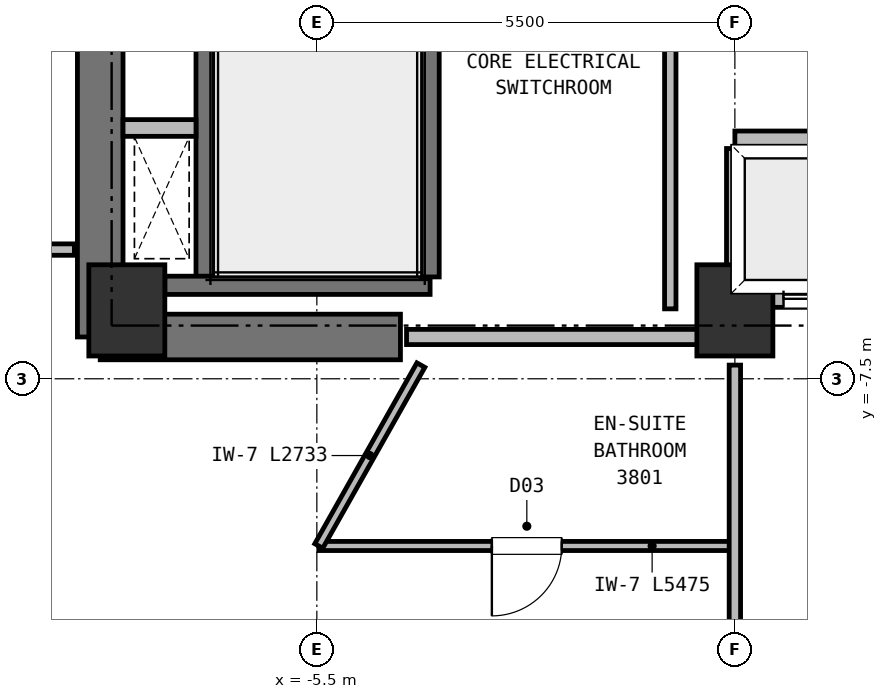
"""IFC4 building model, lengths in metres.
Left out: names, types, materials, properties, quantities, classifications, styles, units other than length and angle.
Written with IfcOpenShell. Run it as: python <this file> out.ifc"""

import sys

from ifc_helpers import new_model, si_unit, direction, frame, frame_2d, origin, origin_2d, place, context, subcontext, project, spatial, rectangle, extrude, element, fill, save


model = new_model("IFC4")
c1 = context("Model", 3, precision=1e-05, world=origin(), true_north=direction((0.0, 1.0)))
c2 = subcontext(c1, "Body", "Model", "MODEL_VIEW")
j1 = project(units=[si_unit("LENGTHUNIT", "METRE"), si_unit("PLANEANGLEUNIT", "RADIAN")], contexts=[c1])
p1 = place(None, origin())
s1 = spatial("IfcSite", under=j1, at=p1, CompositionType="ELEMENT")
p2 = place(p1, origin())
s2 = spatial("IfcBuilding", under=s1, at=p2, CompositionType="ELEMENT")
p3 = place(p2, frame((0.0, 0.0, 142.25)))
s3 = spatial("IfcBuildingStorey", under=s2, at=p3, CompositionType="ELEMENT", Elevation=142.25)
for number, where, z_axis, x_axis in (
    (1, (-8.0, -6.6, 0.0), (0.0, 0.0, 1.0), (1.0, 0.0, 0.0)),
    (2, (0.0, -6.6, 0.0), (0.0, 0.0, 1.0), (1.0, 0.0, 0.0)),
):
    element("IfcColumn", number, at=place(p3, frame(where, z_axis=z_axis, x_axis=x_axis)), inside=s3, PredefinedType="COLUMN", context=c2, shape_type="SweptSolid", body=[
        extrude(rectangle(XDim=1.0, YDim=1.2, at=origin_2d()), origin(), (0.0, 0.0, 1.0), 3.75),
    ])
p4 = place(p3, frame((-8.35, -6.95, 0.0), z_axis=(0.0, 0.0, 1.0), x_axis=(1.0, 0.0, 0.0)))
e3 = element("IfcWall", 3, at=p4, inside=s3, PredefinedType="SHEAR", context=c2, shape_type="SweptSolid", body=[
    extrude(rectangle(XDim=3.95, YDim=0.6, at=frame_2d((1.975, 0.0))), origin(), (0.0, 0.0, 1.0), 3.5),
])
p5 = place(p3, frame((-8.35, -6.95, 0.0), z_axis=(0.0, 0.0, 1.0), x_axis=(0.0, 1.0, 0.0)))
e4 = element("IfcWall", 4, at=p5, inside=s3, PredefinedType="SHEAR", context=c2, shape_type="SweptSolid", body=[
    extrude(rectangle(XDim=8.1, YDim=0.6, at=frame_2d((4.05, 0.0))), origin(), (0.0, 0.0, 1.0), 3.5),
])
p6 = place(p3, frame((-6.97, -6.16, 0.0), z_axis=(0.0, 0.0, 1.0), x_axis=(0.0, 1.0, 0.0)))
e5 = element("IfcWall", 5, at=p6, inside=s3, PredefinedType="SHEAR", context=c2, shape_type="SweptSolid", body=[
    extrude(rectangle(XDim=7.22, YDim=0.24, at=frame_2d((3.61, 0.0))), origin(), (0.0, 0.0, 1.0), 3.5),
])
p7 = place(p3, frame((-7.5, -6.27, 0.0), z_axis=(0.0, 0.0, 1.0), x_axis=(1.0, 0.0, 0.0)))
e6 = element("IfcWall", 6, at=p7, inside=s3, PredefinedType="SHEAR", context=c2, shape_type="SweptSolid", body=[
    extrude(rectangle(XDim=3.49, YDim=0.24, at=frame_2d((1.745, 0.0))), origin(), (0.0, 0.0, 1.0), 3.5),
])
p8 = place(p3, frame((-4.01, -6.16, 0.0), z_axis=(0.0, 0.0, 1.0), x_axis=(0.0, 1.0, 0.0)))
e7 = element("IfcWall", 7, at=p8, inside=s3, PredefinedType="SHEAR", context=c2, shape_type="SweptSolid", body=[
    extrude(rectangle(XDim=7.22, YDim=0.24, at=frame_2d((3.61, 0.0))), origin(), (0.0, 0.0, 1.0), 3.5),
])
p9 = place(p3, frame((-8.05, -4.2, 0.0), z_axis=(0.0, 0.0, 1.0), x_axis=(1.0, 0.0, 0.0)))
e8 = element("IfcWall", 8, at=p9, inside=s3, PredefinedType="PARTITIONING", context=c2, shape_type="SweptSolid", body=[
    extrude(rectangle(XDim=0.96, YDim=0.22, at=frame_2d((0.48, 0.0))), origin(), (0.0, 0.0, 1.0), 3.5),
])
p10 = place(p3, frame((0.0, -6.45, 0.0), z_axis=(0.0, 0.0, 1.0), x_axis=(1.0, 0.0, 0.0)))
e9 = element("IfcWall", 9, at=p10, inside=s3, PredefinedType="PARTITIONING", context=c2, shape_type="SweptSolid", body=[
    extrude(rectangle(XDim=1.86, YDim=0.22, at=frame_2d((0.93, 0.0))), origin(), (0.0, 0.0, 1.0), 3.12),
])
p11 = place(p10, frame((0.64, 0.0, 0.0)))
e10 = element("IfcOpeningElement", 10, at=p11, cuts=e9, PredefinedType="OPENING", context=c2, shape_type="SweptSolid", body=[
    extrude(rectangle(XDim=1.08, YDim=2.15, at=frame_2d((0.54, 1.075))), frame((0.0, 0.12, 0.0), z_axis=(0.0, -1.0, 0.0), x_axis=(1.0, 0.0, 0.0)), (0.0, 0.0, 1.0), 0.24),
])
for number, where, z_axis, x_axis in (
    (11, (0.0, -4.35, 0.0), (0.0, 0.0, 1.0), (1.0, 0.0, 0.0)),
    (12, (0.0, -6.33, 0.0), (0.0, 0.0, 1.0), (0.0, 1.0, 0.0)),
):
    element("IfcWall", number, at=place(p3, frame(where, z_axis=z_axis, x_axis=x_axis)), inside=s3, PredefinedType="PARTITIONING", context=c2, shape_type="SweptSolid", body=[
        extrude(rectangle(XDim=1.86, YDim=0.22, at=frame_2d((0.93, 0.0))), origin(), (0.0, 0.0, 1.0), 3.5),
    ])
p12 = place(p3, frame((-4.32, -6.95, 0.0), z_axis=(0.0, 0.0, 1.0), x_axis=(1.0, 0.0, 0.0)))
e13 = element("IfcWall", 13, at=p12, inside=s3, PredefinedType="PARTITIONING", context=c2, shape_type="SweptSolid", body=[
    extrude(rectangle(XDim=4.32, YDim=0.2, at=frame_2d((2.16, 0.0))), origin(), (0.0, 0.0, 1.0), 3.5),
])
p13 = place(p3, frame((-0.85, -6.58, 0.0), z_axis=(0.0, 0.0, 1.0), x_axis=(0.0, 1.0, 0.0)))
e14 = element("IfcWall", 14, at=p13, inside=s3, PredefinedType="PARTITIONING", context=c2, shape_type="SweptSolid", body=[
    extrude(rectangle(XDim=7.53, YDim=0.15, at=frame_2d((3.765, 0.0))), origin(), (0.0, 0.0, 1.0), 3.5),
])
p14 = place(p3, frame((-8.69, -5.8, 0.0), z_axis=(0.0, 0.0, 1.0), x_axis=(-1.0, 0.0, 0.0)))
e15 = element("IfcWall", 15, at=p14, inside=s3, PredefinedType="PARTITIONING", context=c2, shape_type="SweptSolid", body=[
    extrude(rectangle(XDim=2.02, YDim=0.15, at=frame_2d((1.01, 0.0))), origin(), (0.0, 0.0, 1.0), 3.5),
])
p15 = place(p14, frame((0.52, 0.0, 0.0)))
e16 = element("IfcOpeningElement", 16, at=p15, cuts=e15, PredefinedType="OPENING", context=c2, shape_type="SweptSolid", body=[
    extrude(rectangle(XDim=1.06, YDim=2.15, at=frame_2d((0.53, 1.075))), frame((0.0, 0.085, 0.0), z_axis=(0.0, -1.0, 0.0), x_axis=(1.0, 0.0, 0.0)), (0.0, 0.0, 1.0), 0.17),
])
p16 = place(p3, frame((0.0, -9.7, 0.0), z_axis=(0.0, 0.0, 1.0), x_axis=(-1.0, 0.0, 0.0)))
e17 = element("IfcWall", 17, at=p16, inside=s3, PredefinedType="PARTITIONING", context=c2, shape_type="SweptSolid", body=[
    extrude(rectangle(XDim=5.475, YDim=0.12, at=frame_2d((2.737, 0.0))), origin(), (0.0, 0.0, 1.0), 3.5),
])
p17 = place(p16, frame((2.277, 0.0, 0.0)))
e18 = element("IfcOpeningElement", 18, at=p17, cuts=e17, PredefinedType="OPENING", context=c2, shape_type="SweptSolid", body=[
    extrude(rectangle(XDim=0.92, YDim=2.1, at=frame_2d((0.46, 1.05))), frame((0.0, 0.07, 0.0), z_axis=(0.0, -1.0, 0.0), x_axis=(1.0, 0.0, 0.0)), (0.0, 0.0, 1.0), 0.14),
])
p18 = place(p3, frame((-4.131, -7.32, 0.0), z_axis=(0.0, 0.0, 1.0), x_axis=(-0.491533175525, -0.870858850422, 0.0)))
e19 = element("IfcWall", 19, at=p18, inside=s3, PredefinedType="PARTITIONING", context=c2, shape_type="SweptSolid", body=[
    extrude(rectangle(XDim=2.733, YDim=0.12, at=frame_2d((1.366, 0.0))), origin(), (0.0, 0.0, 1.0), 3.5),
])
p19 = place(p3, frame((0.0, -7.32, 0.0), z_axis=(0.0, 0.0, 1.0), x_axis=(0.0, -1.0, 0.0)))
e20 = element("IfcWall", 20, at=p19, inside=s3, PredefinedType="PARTITIONING", context=c2, shape_type="SweptSolid", body=[
    extrude(rectangle(XDim=12.184, YDim=0.15, at=frame_2d((6.092, 0.0))), origin(), (0.0, 0.0, 1.0), 3.5),
])
p20 = place(p11, origin())
e21 = element("IfcDoor", 21, at=p20, inside=s3, OperationType="DOUBLE_DOOR_SLIDING", PredefinedType="DOOR", context=c2, shape_type="SweptSolid", body=[
    extrude(rectangle(XDim=1.08, YDim=2.15, at=frame_2d((0.54, 1.075))), frame((0.0, 0.025, 0.0), z_axis=(0.0, -1.0, 0.0), x_axis=(1.0, 0.0, 0.0)), (0.0, 0.0, 1.0), 0.05),
])
fill(e10, e21)
p21 = place(p17, origin())
e22 = element("IfcDoor", 22, at=p21, inside=s3, OperationType="SINGLE_SWING_RIGHT", PredefinedType="DOOR", context=c2, shape_type="SweptSolid", body=[
    extrude(rectangle(XDim=0.92, YDim=2.1, at=frame_2d((0.46, 1.05))), frame((0.0, 0.025, 0.0), z_axis=(0.0, -1.0, 0.0), x_axis=(1.0, 0.0, 0.0)), (0.0, 0.0, 1.0), 0.05),
])
fill(e18, e22)
save(model, sys.argv[1])
